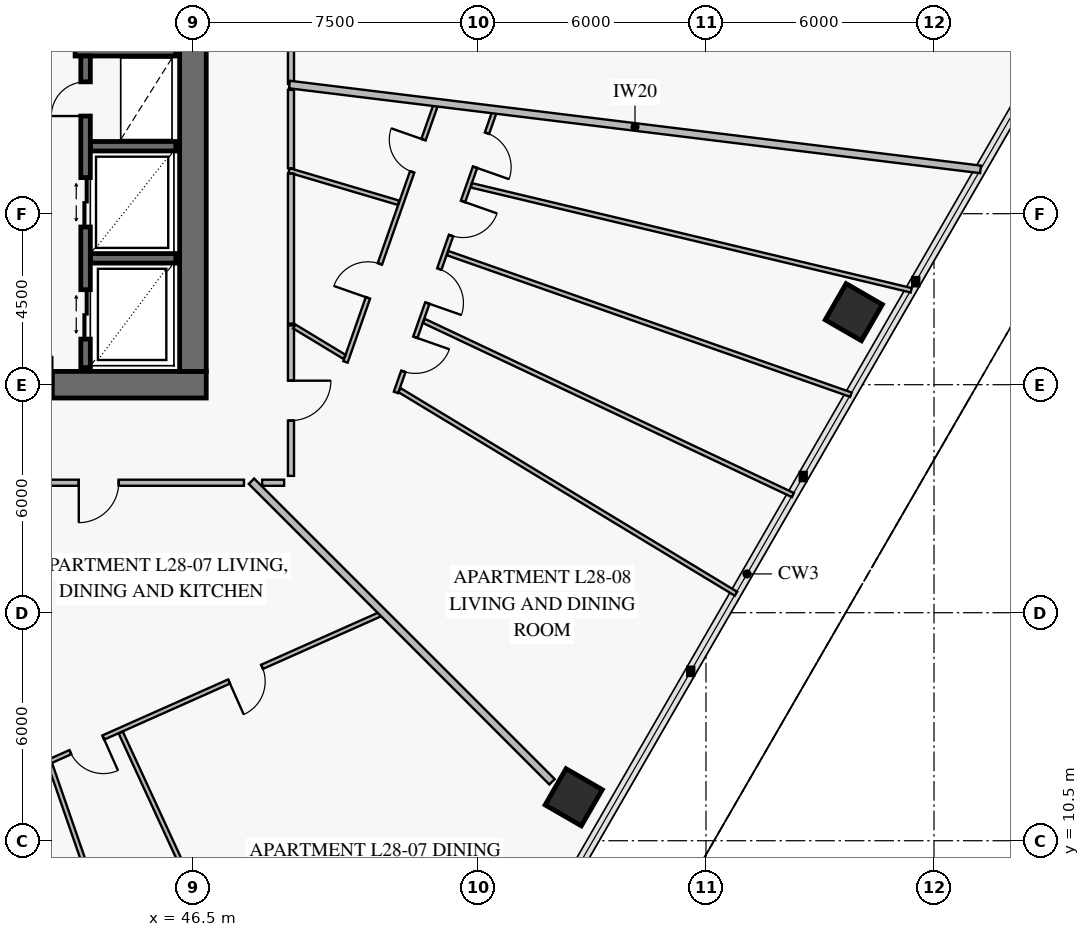
"""IFC4 building model, lengths in metres.
Left out: names, types, materials, properties, quantities, classifications, styles, units other than length and angle.
Written with IfcOpenShell. Run it as: python <this file> out.ifc"""

import sys

from ifc_helpers import new_model, si_unit, direction, frame, frame_2d, origin, origin_2d, place, context, subcontext, project, spatial, rectangle, extrude, element, fill, save


model = new_model("IFC4")
c1 = context("Model", 3, precision=1e-05, world=origin(), true_north=direction((0.0, 1.0)))
c2 = subcontext(c1, "Body", "Model", "MODEL_VIEW")
j1 = project(units=[si_unit("LENGTHUNIT", "METRE"), si_unit("PLANEANGLEUNIT", "RADIAN")], contexts=[c1])
p1 = place(None, origin())
s1 = spatial("IfcSite", under=j1, at=p1, CompositionType="ELEMENT")
p2 = place(p1, origin())
s2 = spatial("IfcBuilding", under=s1, at=p2, CompositionType="ELEMENT")
p3 = place(p2, frame((0.0, 0.0, 115.2)))
s3 = spatial("IfcBuildingStorey", under=s2, at=p3, CompositionType="ELEMENT", Elevation=115.2)
p4 = place(p3, frame((37.35, 22.5, 0.0), z_axis=(0.0, 0.0, 1.0), x_axis=(1.0, 0.0, 0.0)))
e1 = element("IfcWall", 1, at=p4, inside=s3, PredefinedType="SHEAR", context=c2, shape_type="SweptSolid", body=[
    extrude(rectangle(XDim=9.5, YDim=0.7, at=frame_2d((4.75, 0.0))), origin(), (0.0, 0.0, 1.0), 3.8),
])
p5 = place(p4, frame((3.95, 0.0, 0.0)))
e2 = element("IfcOpeningElement", 2, at=p5, cuts=e1, PredefinedType="OPENING", context=c2, shape_type="SweptSolid", body=[
    extrude(rectangle(XDim=1.5, YDim=2.15, at=frame_2d((0.75, 1.075))), frame((0.0, 0.362, 0.0), z_axis=(0.0, -1.0, 0.0), x_axis=(1.0, 0.0, 0.0)), (0.0, 0.0, 1.0), 0.724),
])
p6 = place(p3, frame((46.5, 22.85, 0.0), z_axis=(0.0, 0.0, 1.0), x_axis=(0.0, 1.0, 0.0)))
e3 = element("IfcWall", 3, at=p6, inside=s3, PredefinedType="SHEAR", context=c2, shape_type="SweptSolid", body=[
    extrude(rectangle(XDim=18.3, YDim=0.7, at=frame_2d((9.15, 0.0))), origin(), (0.0, 0.0, 1.0), 3.8),
])
p7 = place(p6, frame((8.9, 0.0, 0.0)))
e4 = element("IfcOpeningElement", 4, at=p7, cuts=e3, PredefinedType="OPENING", context=c2, shape_type="SweptSolid", body=[
    extrude(rectangle(XDim=1.1, YDim=2.15, at=frame_2d((0.55, 1.075))), frame((0.0, 0.362, 0.0), z_axis=(0.0, -1.0, 0.0), x_axis=(1.0, 0.0, 0.0)), (0.0, 0.0, 1.0), 0.724),
])
for number, where, z_axis, x_axis in (
    (5, (56.519, 11.643, 0.0), (0.0, 0.0, 1.0), (0.5, 0.866, 0.0)),
    (6, (63.889, 24.408, 0.0), (0.0, 0.0, 1.0), (0.5, 0.866, 0.0)),
):
    element("IfcColumn", number, at=place(p3, frame(where, z_axis=z_axis, x_axis=x_axis)), inside=s3, PredefinedType="COLUMN", context=c2, shape_type="SweptSolid", body=[
        extrude(rectangle(XDim=1.1, YDim=1.1, at=origin_2d()), origin(), (0.0, 0.0, 1.0), 3.55),
    ])
p8 = place(p3, frame((25.95, 31.275, 0.0), z_axis=(0.0, 0.0, 1.0), x_axis=(1.0, 0.0, 0.0)))
e7 = element("IfcWall", 7, at=p8, inside=s3, PredefinedType="SOLIDWALL", context=c2, shape_type="SweptSolid", body=[
    extrude(rectangle(XDim=20.1, YDim=0.25, at=frame_2d((10.05, 0.0))), origin(), (0.0, 0.0, 1.0), 3.8),
])
p9 = place(p8, frame((2.6, 0.0, 0.0)))
e8 = element("IfcOpeningElement", 8, at=p9, cuts=e7, PredefinedType="OPENING", context=c2, shape_type="SweptSolid", body=[
    extrude(rectangle(XDim=1.1, YDim=2.15, at=frame_2d((0.55, 1.075))), frame((0.0, 0.137, 0.0), z_axis=(0.0, -1.0, 0.0), x_axis=(1.0, 0.0, 0.0)), (0.0, 0.0, 1.0), 0.274),
])
p10 = place(p8, frame((10.6, 0.0, 0.0)))
e9 = element("IfcOpeningElement", 9, at=p10, cuts=e7, PredefinedType="OPENING", context=c2, shape_type="SweptSolid", body=[
    extrude(rectangle(XDim=1.1, YDim=2.15, at=frame_2d((0.55, 1.075))), frame((0.0, 0.137, 0.0), z_axis=(0.0, -1.0, 0.0), x_axis=(1.0, 0.0, 0.0)), (0.0, 0.0, 1.0), 0.274),
])
p11 = place(p8, frame((16.35, 0.0, 0.0)))
e10 = element("IfcOpeningElement", 10, at=p11, cuts=e7, PredefinedType="OPENING", context=c2, shape_type="SweptSolid", body=[
    extrude(rectangle(XDim=1.1, YDim=2.15, at=frame_2d((0.55, 1.075))), frame((0.0, 0.137, 0.0), z_axis=(0.0, -1.0, 0.0), x_axis=(1.0, 0.0, 0.0)), (0.0, 0.0, 1.0), 0.274),
])
for number, where, z_axis, x_axis in (
    (11, (43.8, 25.825, 0.0), (0.0, 0.0, 1.0), (1.0, 0.0, 0.0)),
    (12, (43.8, 28.775, 0.0), (0.0, 0.0, 1.0), (1.0, 0.0, 0.0)),
):
    element("IfcWall", number, at=place(p3, frame(where, z_axis=z_axis, x_axis=x_axis)), inside=s3, PredefinedType="SOLIDWALL", context=c2, shape_type="SweptSolid", body=[
        extrude(rectangle(XDim=2.25, YDim=0.25, at=frame_2d((1.125, 0.0))), origin(), (0.0, 0.0, 1.0), 3.8),
    ])
p12 = place(p3, frame((43.675, 22.95, 0.0), z_axis=(0.0, 0.0, 1.0), x_axis=(0.0, 1.0, 0.0)))
e13 = element("IfcWall", 13, at=p12, inside=s3, PredefinedType="SOLIDWALL", context=c2, shape_type="SweptSolid", body=[
    extrude(rectangle(XDim=8.2, YDim=0.25, at=frame_2d((4.1, 0.0))), origin(), (0.0, 0.0, 1.0), 3.8),
])
p13 = place(p12, frame((0.75, 0.0, 0.0)))
e14 = element("IfcOpeningElement", 14, at=p13, cuts=e13, PredefinedType="OPENING", context=c2, shape_type="SweptSolid", body=[
    extrude(rectangle(XDim=1.3, YDim=2.3, at=frame_2d((0.65, 1.15))), frame((0.0, 0.137, 0.0), z_axis=(0.0, -1.0, 0.0), x_axis=(1.0, 0.0, 0.0)), (0.0, 0.0, 1.0), 0.274),
])
p14 = place(p12, frame((3.7, 0.0, 0.0)))
e15 = element("IfcOpeningElement", 15, at=p14, cuts=e13, PredefinedType="OPENING", context=c2, shape_type="SweptSolid", body=[
    extrude(rectangle(XDim=1.3, YDim=2.3, at=frame_2d((0.65, 1.15))), frame((0.0, 0.137, 0.0), z_axis=(0.0, -1.0, 0.0), x_axis=(1.0, 0.0, 0.0)), (0.0, 0.0, 1.0), 0.274),
])
p15 = place(p12, frame((6.62, 0.0, 0.0)))
e16 = element("IfcOpeningElement", 16, at=p15, cuts=e13, PredefinedType="OPENING", context=c2, shape_type="SweptSolid", body=[
    extrude(rectangle(XDim=0.9, YDim=2.1, at=frame_2d((0.45, 1.05))), frame((0.0, 0.137, 0.0), z_axis=(0.0, -1.0, 0.0), x_axis=(1.0, 0.0, 0.0)), (0.0, 0.0, 1.0), 0.274),
])
p16 = place(p3, frame((42.625, 12.541, 0.0), z_axis=(0.0, 0.0, 1.0), x_axis=(0.913542487884, 0.406743313198, 0.0)))
e17 = element("IfcWall", 17, at=p16, inside=s3, PredefinedType="PARTITIONING", context=c2, shape_type="SweptSolid", body=[
    extrude(rectangle(XDim=9.624, YDim=0.12, at=frame_2d((4.812, 0.0))), origin(), (0.0, 0.0, 1.0), 3.1),
])
p17 = place(p16, frame((0.711, 0.0, 0.0)))
e18 = element("IfcOpeningElement", 18, at=p17, cuts=e17, PredefinedType="OPENING", context=c2, shape_type="SweptSolid", body=[
    extrude(rectangle(XDim=0.95, YDim=2.1, at=frame_2d((0.475, 1.05))), frame((0.0, 0.072, 0.0), z_axis=(0.0, -1.0, 0.0), x_axis=(1.0, 0.0, 0.0)), (0.0, 0.0, 1.0), 0.144),
])
p18 = place(p16, frame((5.282, 0.0, 0.0)))
e19 = element("IfcOpeningElement", 19, at=p18, cuts=e17, PredefinedType="OPENING", context=c2, shape_type="SweptSolid", body=[
    extrude(rectangle(XDim=0.95, YDim=2.1, at=frame_2d((0.475, 1.05))), frame((0.0, 0.072, 0.0), z_axis=(0.0, -1.0, 0.0), x_axis=(1.0, 0.0, 0.0)), (0.0, 0.0, 1.0), 0.144),
])
p19 = place(p3, frame((42.739, 12.517, 0.0), z_axis=(0.0, 0.0, 1.0), x_axis=(0.32689789909, -0.945059661382, 0.0)))
e20 = element("IfcWall", 20, at=p19, inside=s3, PredefinedType="PARTITIONING", context=c2, shape_type="SweptSolid", body=[
    extrude(rectangle(XDim=5.639, YDim=0.12, at=frame_2d((2.819, 0.0))), origin(), (0.0, 0.0, 1.0), 3.55),
])
p20 = place(p3, frame((40.199, 19.92, 0.0), z_axis=(0.0, 0.0, 1.0), x_axis=(1.0, 0.0, 0.0)))
e21 = element("IfcWall", 21, at=p20, inside=s3, PredefinedType="PARTITIONING", context=c2, shape_type="SweptSolid", body=[
    extrude(rectangle(XDim=7.644, YDim=0.16, at=frame_2d((3.822, 0.0))), origin(), (0.0, 0.0, 1.0), 3.55),
])
p21 = place(p20, frame((3.297, 0.0, 0.0)))
e22 = element("IfcOpeningElement", 22, at=p21, cuts=e21, PredefinedType="OPENING", context=c2, shape_type="SweptSolid", body=[
    extrude(rectangle(XDim=1.05, YDim=2.15, at=frame_2d((0.525, 1.075))), frame((0.0, 0.092, 0.0), z_axis=(0.0, -1.0, 0.0), x_axis=(1.0, 0.0, 0.0)), (0.0, 0.0, 1.0), 0.184),
])
p22 = place(p3, frame((50.514, 23.1, 0.0), z_axis=(0.0, 0.0, 1.0), x_axis=(0.331189129745, 0.943564391199, 0.0)))
e23 = element("IfcWall", 23, at=p22, inside=s3, PredefinedType="PARTITIONING", context=c2, shape_type="SweptSolid", body=[
    extrude(rectangle(XDim=7.182, YDim=0.12, at=frame_2d((3.591, 0.0))), origin(), (0.0, 0.0, 1.0), 2.85),
])
p23 = place(p22, frame((1.785, 0.0, 0.0)))
e24 = element("IfcOpeningElement", 24, at=p23, cuts=e23, PredefinedType="OPENING", context=c2, shape_type="SweptSolid", body=[
    extrude(rectangle(XDim=0.95, YDim=2.1, at=frame_2d((0.475, 1.05))), frame((0.0, 0.072, 0.0), z_axis=(0.0, -1.0, 0.0), x_axis=(1.0, 0.0, 0.0)), (0.0, 0.0, 1.0), 0.144),
])
p24 = place(p22, frame((5.299, 0.0, 0.0)))
e25 = element("IfcOpeningElement", 25, at=p24, cuts=e23, PredefinedType="OPENING", context=c2, shape_type="SweptSolid", body=[
    extrude(rectangle(XDim=0.9, YDim=2.1, at=frame_2d((0.45, 1.05))), frame((0.0, 0.072, 0.0), z_axis=(0.0, -1.0, 0.0), x_axis=(1.0, 0.0, 0.0)), (0.0, 0.0, 1.0), 0.144),
])
p25 = place(p3, frame((51.843, 22.296, 0.0), z_axis=(0.0, 0.0, 1.0), x_axis=(0.331165256289, 0.943572770393, 0.0)))
e26 = element("IfcWall", 26, at=p25, inside=s3, PredefinedType="PARTITIONING", context=c2, shape_type="SweptSolid", body=[
    extrude(rectangle(XDim=7.82, YDim=0.12, at=frame_2d((3.91, 0.0))), origin(), (0.0, 0.0, 1.0), 2.85),
])
p26 = place(p25, frame((0.588, 0.0, 0.0)))
e27 = element("IfcOpeningElement", 27, at=p26, cuts=e26, PredefinedType="OPENING", context=c2, shape_type="SweptSolid", body=[
    extrude(rectangle(XDim=0.95, YDim=2.1, at=frame_2d((0.475, 1.05))), frame((0.0, 0.072, 0.0), z_axis=(0.0, -1.0, 0.0), x_axis=(1.0, 0.0, 0.0)), (0.0, 0.0, 1.0), 0.144),
])
p27 = place(p25, frame((2.493, 0.0, 0.0)))
e28 = element("IfcOpeningElement", 28, at=p27, cuts=e26, PredefinedType="OPENING", context=c2, shape_type="SweptSolid", body=[
    extrude(rectangle(XDim=0.95, YDim=2.1, at=frame_2d((0.475, 1.05))), frame((0.0, 0.072, 0.0), z_axis=(0.0, -1.0, 0.0), x_axis=(1.0, 0.0, 0.0)), (0.0, 0.0, 1.0), 0.144),
])
p28 = place(p25, frame((4.377, 0.0, 0.0)))
e29 = element("IfcOpeningElement", 29, at=p28, cuts=e26, PredefinedType="OPENING", context=c2, shape_type="SweptSolid", body=[
    extrude(rectangle(XDim=0.95, YDim=2.1, at=frame_2d((0.475, 1.05))), frame((0.0, 0.072, 0.0), z_axis=(0.0, -1.0, 0.0), x_axis=(1.0, 0.0, 0.0)), (0.0, 0.0, 1.0), 0.144),
])
p29 = place(p25, frame((6.281, 0.0, 0.0)))
e30 = element("IfcOpeningElement", 30, at=p29, cuts=e26, PredefinedType="OPENING", context=c2, shape_type="SweptSolid", body=[
    extrude(rectangle(XDim=0.95, YDim=2.1, at=frame_2d((0.475, 1.05))), frame((0.0, 0.072, 0.0), z_axis=(0.0, -1.0, 0.0), x_axis=(1.0, 0.0, 0.0)), (0.0, 0.0, 1.0), 0.144),
])
p30 = place(p3, frame((49.08, 20.101, 0.0), z_axis=(0.0, 0.0, 1.0), x_axis=(0.0, 1.0, 0.0)))
e31 = element("IfcWall", 31, at=p30, inside=s3, PredefinedType="PARTITIONING", context=c2, shape_type="SweptSolid", body=[
    extrude(rectangle(XDim=3.961, YDim=0.16, at=frame_2d((1.98, 0.0))), origin(), (0.0, 0.0, 1.0), 3.55),
])
p31 = place(p30, frame((1.455, 0.0, 0.0)))
e32 = element("IfcOpeningElement", 32, at=p31, cuts=e31, PredefinedType="OPENING", context=c2, shape_type="SweptSolid", body=[
    extrude(rectangle(XDim=1.05, YDim=2.15, at=frame_2d((0.525, 1.075))), frame((0.0, 0.092, 0.0), z_axis=(0.0, -1.0, 0.0), x_axis=(1.0, 0.0, 0.0)), (0.0, 0.0, 1.0), 0.184),
])
p32 = place(p3, frame((49.08, 30.414, 0.0), z_axis=(0.0, 0.0, 1.0), x_axis=(0.0, 1.0, 0.0)))
e33 = element("IfcWall", 33, at=p32, inside=s3, PredefinedType="PARTITIONING", context=c2, shape_type="SweptSolid", body=[
    extrude(rectangle(XDim=10.056, YDim=0.16, at=frame_2d((5.028, 0.0))), origin(), (0.0, 0.0, 1.0), 2.85),
])
p33 = place(p32, frame((4.453, 0.0, 0.0)))
e34 = element("IfcOpeningElement", 34, at=p33, cuts=e33, PredefinedType="OPENING", context=c2, shape_type="SweptSolid", body=[
    extrude(rectangle(XDim=1.15, YDim=2.2, at=frame_2d((0.575, 1.1))), frame((0.0, 0.092, 0.0), z_axis=(0.0, -1.0, 0.0), x_axis=(1.0, 0.0, 0.0)), (0.0, 0.0, 1.0), 0.184),
])
p34 = place(p3, frame((44.601, 13.346, 0.0), z_axis=(0.0, 0.0, 1.0), x_axis=(0.418713944569, -0.90811818208, 0.0)))
e35 = element("IfcWall", 35, at=p34, inside=s3, PredefinedType="PARTITIONING", context=c2, shape_type="SweptSolid", body=[
    extrude(rectangle(XDim=11.38, YDim=0.12, at=frame_2d((5.69, 0.0))), origin(), (0.0, 0.0, 1.0), 2.8),
])
p35 = place(p3, frame((48.04, 19.96, 0.0), z_axis=(0.0, 0.0, 1.0), x_axis=(0.707106781187, -0.707106781187, 0.0)))
e36 = element("IfcWall", 36, at=p35, inside=s3, PredefinedType="PARTITIONING", context=c2, shape_type="SweptSolid", body=[
    extrude(rectangle(XDim=11.185, YDim=0.2, at=frame_2d((5.592, 0.0))), origin(), (0.0, 0.0, 1.0), 2.85),
])
p36 = place(p3, frame((49.03, 28.141, 0.0), z_axis=(0.0, 0.0, 1.0), x_axis=(0.958846452048, -0.283925133433, 0.0)))
e37 = element("IfcWall", 37, at=p36, inside=s3, PredefinedType="PARTITIONING", context=c2, shape_type="SweptSolid", body=[
    extrude(rectangle(XDim=3.005, YDim=0.12, at=frame_2d((1.503, 0.0))), origin(), (0.0, 0.0, 1.0), 3.55),
])
p37 = place(p3, frame((52.576, 24.179, 0.0), z_axis=(0.0, 0.0, 1.0), x_axis=(0.904375150032, -0.42673831326, 0.0)))
e38 = element("IfcWall", 38, at=p37, inside=s3, PredefinedType="PARTITIONING", context=c2, shape_type="SweptSolid", body=[
    extrude(rectangle(XDim=10.74, YDim=0.12, at=frame_2d((5.37, 0.0))), origin(), (0.0, 0.0, 1.0), 2.8),
])
p38 = place(p3, frame((53.202, 25.963, 0.0), z_axis=(0.0, 0.0, 1.0), x_axis=(0.943569995537, -0.331173162443, 0.0)))
e39 = element("IfcWall", 39, at=p38, inside=s3, PredefinedType="PARTITIONING", context=c2, shape_type="SweptSolid", body=[
    extrude(rectangle(XDim=11.247, YDim=0.12, at=frame_2d((5.624, 0.0))), origin(), (0.0, 0.0, 1.0), 2.8),
])
p39 = place(p3, frame((53.828, 27.746, 0.0), z_axis=(0.0, 0.0, 1.0), x_axis=(0.972698440047, -0.232072714314, 0.0)))
e40 = element("IfcWall", 40, at=p39, inside=s3, PredefinedType="PARTITIONING", context=c2, shape_type="SweptSolid", body=[
    extrude(rectangle(XDim=11.897, YDim=0.12, at=frame_2d((5.948, 0.0))), origin(), (0.0, 0.0, 1.0), 2.8),
])
p40 = place(p3, frame((49.168, 24.031, 0.0), z_axis=(0.0, 0.0, 1.0), x_axis=(0.855518519858, -0.517772210706, 0.0)))
e41 = element("IfcWall", 41, at=p40, inside=s3, PredefinedType="PARTITIONING", context=c2, shape_type="SweptSolid", body=[
    extrude(rectangle(XDim=1.543, YDim=0.12, at=frame_2d((0.771, 0.0))), origin(), (0.0, 0.0, 1.0), 3.55),
])
p41 = place(p3, frame((51.936, 22.356, 0.0), z_axis=(0.0, 0.0, 1.0), x_axis=(0.855542431798, -0.517732698786, 0.0)))
e42 = element("IfcWall", 42, at=p41, inside=s3, PredefinedType="PARTITIONING", context=c2, shape_type="SweptSolid", body=[
    extrude(rectangle(XDim=10.348, YDim=0.12, at=frame_2d((5.174, 0.0))), origin(), (0.0, 0.0, 1.0), 2.8),
])
p42 = place(p3, frame((49.04, 30.399, 0.0), z_axis=(0.0, 0.0, 1.0), x_axis=(0.99254551981, -0.121874489148, 0.0)))
e43 = element("IfcWall", 43, at=p42, inside=s3, PredefinedType="PARTITIONING", context=c2, shape_type="SweptSolid", body=[
    extrude(rectangle(XDim=18.321, YDim=0.2, at=frame_2d((9.161, 0.0))), origin(), (0.0, 0.0, 1.0), 2.8),
])
p43 = place(p3, frame((48.321, 19.92, 0.0), z_axis=(0.0, 0.0, 1.0), x_axis=(1.0, 0.0, 0.0)))
e44 = element("IfcWall", 44, at=p43, inside=s3, PredefinedType="PARTITIONING", context=c2, shape_type="SweptSolid", body=[
    extrude(rectangle(XDim=0.578, YDim=0.16, at=frame_2d((0.289, 0.0))), origin(), (0.0, 0.0, 1.0), 2.85),
])
p44 = place(p3, frame((49.08, 24.108, 0.0), z_axis=(0.0, 0.0, 1.0), x_axis=(0.0, 1.0, 0.0)))
e45 = element("IfcWall", 45, at=p44, inside=s3, PredefinedType="PARTITIONING", context=c2, shape_type="SweptSolid", body=[
    extrude(rectangle(XDim=3.947, YDim=0.16, at=frame_2d((1.973, 0.0))), origin(), (0.0, 0.0, 1.0), 3.55),
])
p45 = place(p3, frame((49.08, 28.197, 0.0), z_axis=(0.0, 0.0, 1.0), x_axis=(0.0, 1.0, 0.0)))
e46 = element("IfcWall", 46, at=p45, inside=s3, PredefinedType="PARTITIONING", context=c2, shape_type="SweptSolid", body=[
    extrude(rectangle(XDim=2.061, YDim=0.16, at=frame_2d((1.031, 0.0))), origin(), (0.0, 0.0, 1.0), 2.85),
])
p46 = place(p11, origin())
e47 = element("IfcDoor", 47, at=p46, inside=s3, OperationType="SINGLE_SWING_LEFT", PredefinedType="USERDEFINED", context=c2, shape_type="SweptSolid", body=[
    extrude(rectangle(XDim=1.1, YDim=2.15, at=frame_2d((0.55, 1.075))), frame((0.0, 0.025, 0.0), z_axis=(0.0, -1.0, 0.0), x_axis=(1.0, 0.0, 0.0)), (0.0, 0.0, 1.0), 0.05),
])
fill(e10, e47)
p47 = place(p13, origin())
e48 = element("IfcDoor", 48, at=p47, inside=s3, OperationType="DOUBLE_DOOR_SLIDING", PredefinedType="DOOR", context=c2, shape_type="SweptSolid", body=[
    extrude(rectangle(XDim=1.3, YDim=2.3, at=frame_2d((0.65, 1.15))), frame((0.0, 0.025, 0.0), z_axis=(0.0, -1.0, 0.0), x_axis=(1.0, 0.0, 0.0)), (0.0, 0.0, 1.0), 0.05),
])
fill(e14, e48)
p48 = place(p14, origin())
e49 = element("IfcDoor", 49, at=p48, inside=s3, OperationType="DOUBLE_DOOR_SLIDING", PredefinedType="DOOR", context=c2, shape_type="SweptSolid", body=[
    extrude(rectangle(XDim=1.3, YDim=2.3, at=frame_2d((0.65, 1.15))), frame((0.0, 0.025, 0.0), z_axis=(0.0, -1.0, 0.0), x_axis=(1.0, 0.0, 0.0)), (0.0, 0.0, 1.0), 0.05),
])
fill(e15, e49)
p49 = place(p15, origin())
e50 = element("IfcDoor", 50, at=p49, inside=s3, OperationType="SINGLE_SWING_LEFT", PredefinedType="DOOR", context=c2, shape_type="SweptSolid", body=[
    extrude(rectangle(XDim=0.9, YDim=2.1, at=frame_2d((0.45, 1.05))), frame((0.0, 0.025, 0.0), z_axis=(0.0, -1.0, 0.0), x_axis=(1.0, 0.0, 0.0)), (0.0, 0.0, 1.0), 0.05),
])
fill(e16, e50)
p50 = place(p17, frame((0.95, 0.0, 0.0), z_axis=(0.0, 0.0, 1.0), x_axis=(-1.0, 0.0, 0.0)))
e51 = element("IfcDoor", 51, at=p50, inside=s3, OperationType="SINGLE_SWING_LEFT", PredefinedType="DOOR", context=c2, shape_type="SweptSolid", body=[
    extrude(rectangle(XDim=0.95, YDim=2.1, at=frame_2d((0.475, 1.05))), frame((0.0, 0.025, 0.0), z_axis=(0.0, -1.0, 0.0), x_axis=(1.0, 0.0, 0.0)), (0.0, 0.0, 1.0), 0.05),
])
fill(e18, e51)
p51 = place(p18, frame((0.95, 0.0, 0.0), z_axis=(0.0, 0.0, 1.0), x_axis=(-1.0, 0.0, 0.0)))
e52 = element("IfcDoor", 52, at=p51, inside=s3, OperationType="SINGLE_SWING_RIGHT", PredefinedType="DOOR", context=c2, shape_type="SweptSolid", body=[
    extrude(rectangle(XDim=0.95, YDim=2.1, at=frame_2d((0.475, 1.05))), frame((0.0, 0.025, 0.0), z_axis=(0.0, -1.0, 0.0), x_axis=(1.0, 0.0, 0.0)), (0.0, 0.0, 1.0), 0.05),
])
fill(e19, e52)
p52 = place(p21, frame((1.05, 0.0, 0.0), z_axis=(0.0, 0.0, 1.0), x_axis=(-1.0, 0.0, 0.0)))
e53 = element("IfcDoor", 53, at=p52, inside=s3, OperationType="SINGLE_SWING_RIGHT", PredefinedType="DOOR", context=c2, shape_type="SweptSolid", body=[
    extrude(rectangle(XDim=1.05, YDim=2.15, at=frame_2d((0.525, 1.075))), frame((0.0, 0.025, 0.0), z_axis=(0.0, -1.0, 0.0), x_axis=(1.0, 0.0, 0.0)), (0.0, 0.0, 1.0), 0.05),
])
fill(e22, e53)
p53 = place(p23, origin())
e54 = element("IfcDoor", 54, at=p53, inside=s3, OperationType="SINGLE_SWING_LEFT", PredefinedType="DOOR", context=c2, shape_type="SweptSolid", body=[
    extrude(rectangle(XDim=0.95, YDim=2.1, at=frame_2d((0.475, 1.05))), frame((0.0, 0.025, 0.0), z_axis=(0.0, -1.0, 0.0), x_axis=(1.0, 0.0, 0.0)), (0.0, 0.0, 1.0), 0.05),
])
fill(e24, e54)
p54 = place(p24, origin())
e55 = element("IfcDoor", 55, at=p54, inside=s3, OperationType="SINGLE_SWING_RIGHT", PredefinedType="DOOR", context=c2, shape_type="SweptSolid", body=[
    extrude(rectangle(XDim=0.9, YDim=2.1, at=frame_2d((0.45, 1.05))), frame((0.0, 0.025, 0.0), z_axis=(0.0, -1.0, 0.0), x_axis=(1.0, 0.0, 0.0)), (0.0, 0.0, 1.0), 0.05),
])
fill(e25, e55)
p55 = place(p26, frame((0.95, 0.0, 0.0), z_axis=(0.0, 0.0, 1.0), x_axis=(-1.0, 0.0, 0.0)))
e56 = element("IfcDoor", 56, at=p55, inside=s3, OperationType="SINGLE_SWING_LEFT", PredefinedType="DOOR", context=c2, shape_type="SweptSolid", body=[
    extrude(rectangle(XDim=0.95, YDim=2.1, at=frame_2d((0.475, 1.05))), frame((0.0, 0.025, 0.0), z_axis=(0.0, -1.0, 0.0), x_axis=(1.0, 0.0, 0.0)), (0.0, 0.0, 1.0), 0.05),
])
fill(e27, e56)
p56 = place(p27, frame((0.95, 0.0, 0.0), z_axis=(0.0, 0.0, 1.0), x_axis=(-1.0, 0.0, 0.0)))
e57 = element("IfcDoor", 57, at=p56, inside=s3, OperationType="SINGLE_SWING_RIGHT", PredefinedType="DOOR", context=c2, shape_type="SweptSolid", body=[
    extrude(rectangle(XDim=0.95, YDim=2.1, at=frame_2d((0.475, 1.05))), frame((0.0, 0.025, 0.0), z_axis=(0.0, -1.0, 0.0), x_axis=(1.0, 0.0, 0.0)), (0.0, 0.0, 1.0), 0.05),
])
fill(e28, e57)
p57 = place(p28, frame((0.95, 0.0, 0.0), z_axis=(0.0, 0.0, 1.0), x_axis=(-1.0, 0.0, 0.0)))
e58 = element("IfcDoor", 58, at=p57, inside=s3, OperationType="SINGLE_SWING_LEFT", PredefinedType="DOOR", context=c2, shape_type="SweptSolid", body=[
    extrude(rectangle(XDim=0.95, YDim=2.1, at=frame_2d((0.475, 1.05))), frame((0.0, 0.025, 0.0), z_axis=(0.0, -1.0, 0.0), x_axis=(1.0, 0.0, 0.0)), (0.0, 0.0, 1.0), 0.05),
])
fill(e29, e58)
p58 = place(p29, frame((0.95, 0.0, 0.0), z_axis=(0.0, 0.0, 1.0), x_axis=(-1.0, 0.0, 0.0)))
e59 = element("IfcDoor", 59, at=p58, inside=s3, OperationType="SINGLE_SWING_RIGHT", PredefinedType="DOOR", context=c2, shape_type="SweptSolid", body=[
    extrude(rectangle(XDim=0.95, YDim=2.1, at=frame_2d((0.475, 1.05))), frame((0.0, 0.025, 0.0), z_axis=(0.0, -1.0, 0.0), x_axis=(1.0, 0.0, 0.0)), (0.0, 0.0, 1.0), 0.05),
])
fill(e30, e59)
p59 = place(p31, frame((1.05, 0.0, 0.0), z_axis=(0.0, 0.0, 1.0), x_axis=(-1.0, 0.0, 0.0)))
e60 = element("IfcDoor", 60, at=p59, inside=s3, OperationType="SINGLE_SWING_LEFT", PredefinedType="DOOR", context=c2, shape_type="SweptSolid", body=[
    extrude(rectangle(XDim=1.05, YDim=2.15, at=frame_2d((0.525, 1.075))), frame((0.0, 0.025, 0.0), z_axis=(0.0, -1.0, 0.0), x_axis=(1.0, 0.0, 0.0)), (0.0, 0.0, 1.0), 0.05),
])
fill(e32, e60)
save(model, sys.argv[1])
